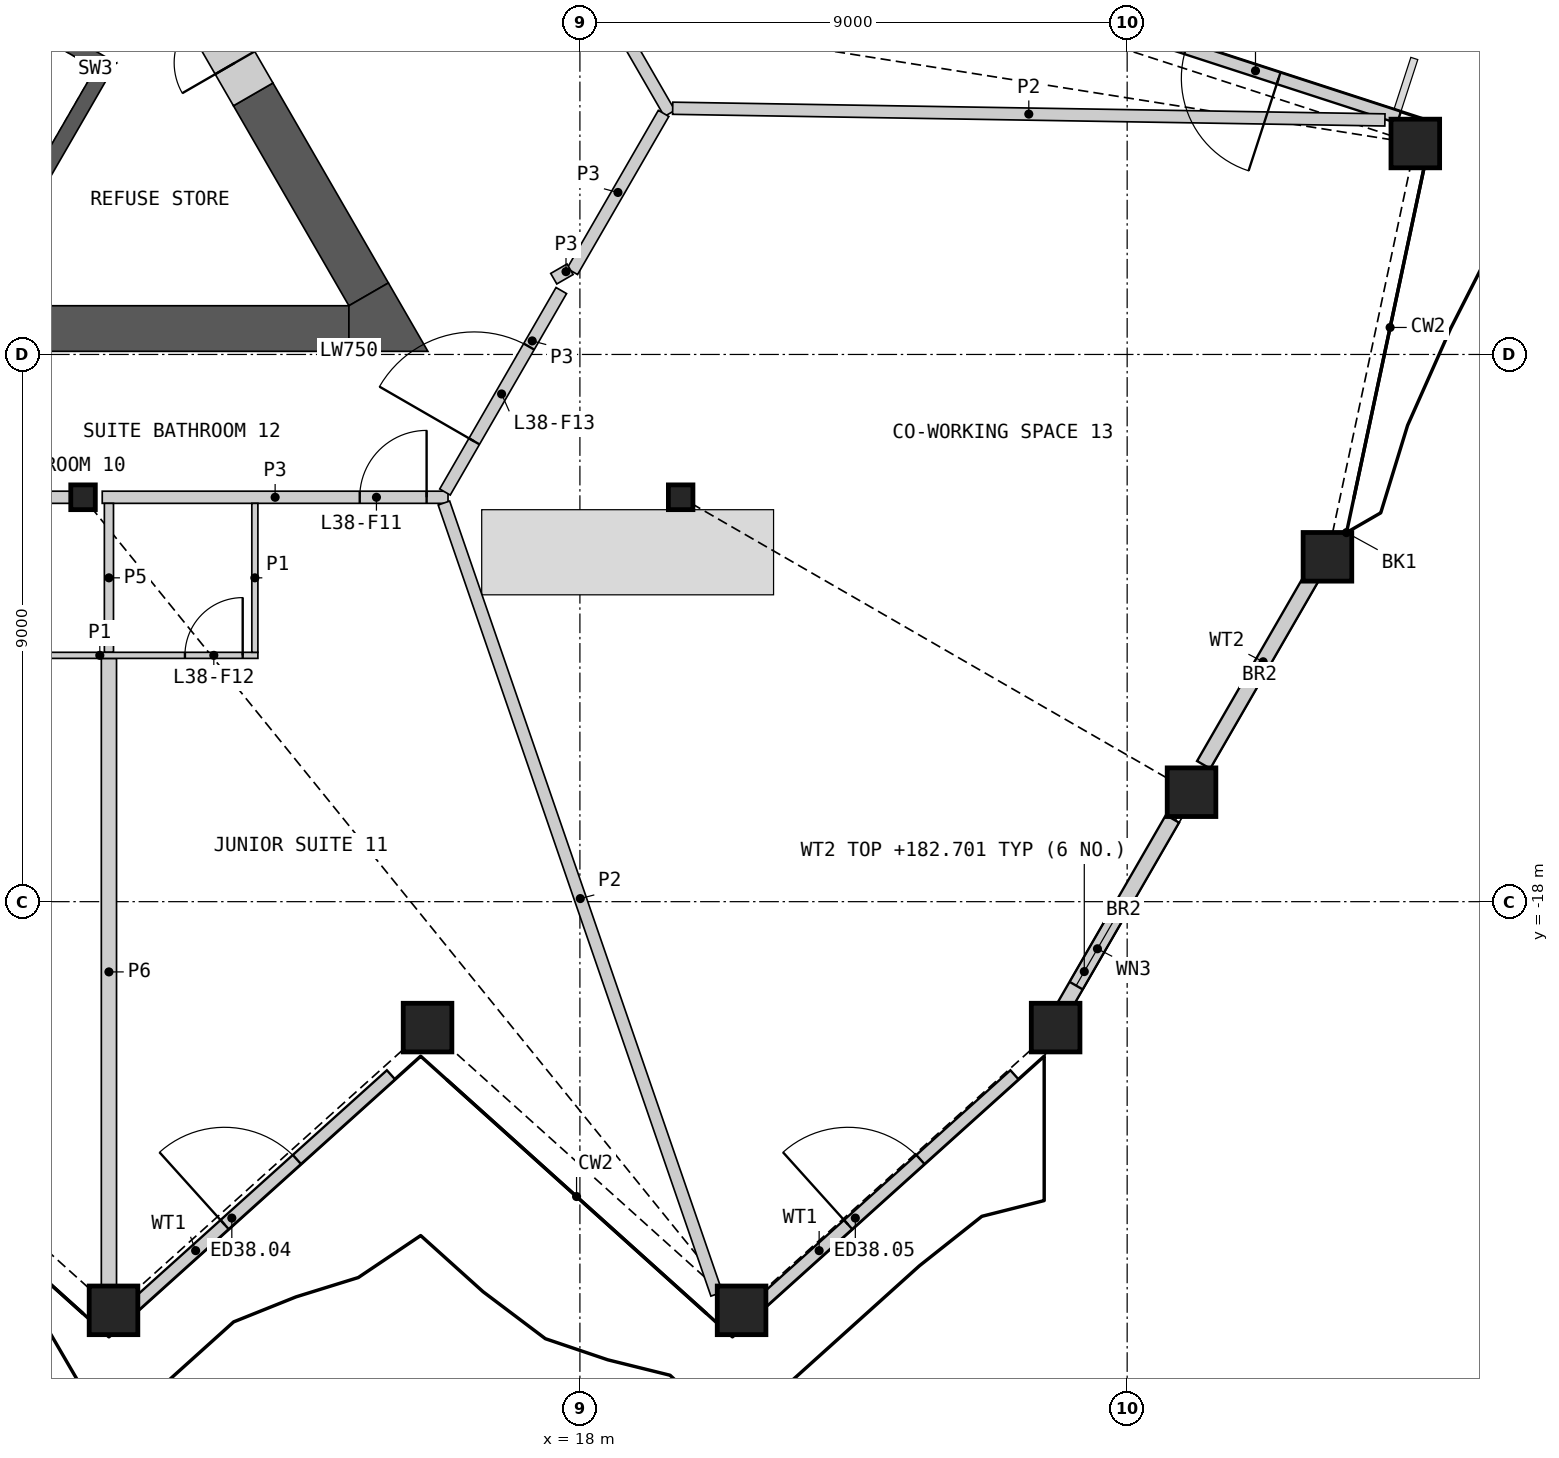
"""IFC4 building model, lengths in metres.
Left out: names, types, materials, properties, quantities, classifications, styles, units other than length and angle.
Written with IfcOpenShell. Run it as: python <this file> out.ifc"""

import sys

from ifc_helpers import new_model, si_unit, direction, frame, frame_2d, origin, origin_2d, place, context, subcontext, project, spatial, polyline, rectangle, hollow_rectangle, i_section, outline, extrude, element, fill, save


model = new_model("IFC4")
c1 = context("Model", 3, precision=1e-05, world=origin(), true_north=direction((0.0, 1.0)))
c2 = subcontext(c1, "Body", "Model", "MODEL_VIEW")
j1 = project(units=[si_unit("LENGTHUNIT", "METRE"), si_unit("PLANEANGLEUNIT", "RADIAN")], contexts=[c1])
p1 = place(None, origin())
s1 = spatial("IfcSite", under=j1, at=p1, CompositionType="ELEMENT")
p2 = place(p1, origin())
s2 = spatial("IfcBuilding", under=s1, at=p2, CompositionType="ELEMENT")
p3 = place(p2, frame((0.0, 0.0, 180.0)))
s3 = spatial("IfcBuildingStorey", under=s2, at=p3, CompositionType="ELEMENT", Elevation=180.0)
for number, where, z_axis, x_axis in (
    (1, (10.329, -24.722, 0.0), (0.0, 0.0, 1.0), (1.0, 0.0, 0.0)),
    (2, (15.494, -20.071, 0.0), (0.0, 0.0, 1.0), (1.0, 0.0, 0.0)),
    (3, (20.659, -24.722, 0.0), (0.0, 0.0, 1.0), (1.0, 0.0, 0.0)),
    (4, (25.823, -20.071, 0.0), (0.0, 0.0, 1.0), (1.0, 0.0, 0.0)),
    (5, (28.059, -16.2, 0.0), (0.0, 0.0, 1.0), (1.0, 0.0, 0.0)),
    (6, (30.294, -12.328, 0.0), (0.0, 0.0, 1.0), (1.0, 0.0, 0.0)),
    (7, (31.739, -5.53, 0.0), (0.0, 0.0, 1.0), (1.0, 0.0, 0.0)),
):
    element("IfcColumn", number, at=place(p3, frame(where, z_axis=z_axis, x_axis=x_axis)), inside=s3, PredefinedType="COLUMN", context=c2, shape_type="SweptSolid", body=[
        extrude(hollow_rectangle(XDim=0.8, YDim=0.8, WallThickness=0.05, at=origin_2d()), origin(), (0.0, 0.0, 1.0), 3.6),
    ])
for number, where, z_axis, x_axis in (
    (8, (9.828, -11.349, 0.0), (0.0, 0.0, 1.0), (1.0, 0.0, 0.0)),
    (9, (19.657, -11.349, 0.0), (0.0, 0.0, 1.0), (1.0, 0.0, 0.0)),
):
    element("IfcColumn", number, at=place(p3, frame(where, z_axis=z_axis, x_axis=x_axis)), inside=s3, PredefinedType="COLUMN", context=c2, shape_type="SweptSolid", body=[
        extrude(i_section(OverallWidth=0.404, OverallDepth=0.407, WebThickness=0.027, FlangeThickness=0.044, at=origin_2d()), origin(), (0.0, 0.0, 1.0), 3.6),
    ])
p4 = place(p3, frame((10.609, -24.704, 0.0), z_axis=(0.0, 0.0, 1.0), x_axis=(0.743140362926, 0.669135562491, 0.0)))
e10 = element("IfcWall", 10, at=p4, inside=s3, PredefinedType="SOLIDWALL", context=c2, shape_type="SweptSolid", body=[
    extrude(rectangle(XDim=5.763, YDim=0.2, at=frame_2d((2.882, 0.0))), origin(), (0.0, 0.0, 1.0), 2.701),
])
p5 = place(p4, frame((2.082, 0.0, 0.0)))
e11 = element("IfcOpeningElement", 11, at=p5, cuts=e10, PredefinedType="OPENING", context=c2, shape_type="SweptSolid", body=[
    extrude(rectangle(XDim=1.6, YDim=2.4, at=frame_2d((0.8, 1.2))), frame((0.0, 0.11, 0.0), z_axis=(0.0, -1.0, 0.0), x_axis=(1.0, 0.0, 0.0)), (0.0, 0.0, 1.0), 0.22),
])
p6 = place(p3, frame((20.864, -24.704, 0.0), z_axis=(0.0, 0.0, 1.0), x_axis=(0.743140362926, 0.669135562491, 0.0)))
e12 = element("IfcWall", 12, at=p6, inside=s3, PredefinedType="SOLIDWALL", context=c2, shape_type="SweptSolid", body=[
    extrude(rectangle(XDim=5.763, YDim=0.2, at=frame_2d((2.882, 0.0))), origin(), (0.0, 0.0, 1.0), 2.701),
])
p7 = place(p6, frame((2.082, 0.0, 0.0)))
e13 = element("IfcOpeningElement", 13, at=p7, cuts=e12, PredefinedType="OPENING", context=c2, shape_type="SweptSolid", body=[
    extrude(rectangle(XDim=1.6, YDim=2.4, at=frame_2d((0.8, 1.2))), frame((0.0, 0.11, 0.0), z_axis=(0.0, -1.0, 0.0), x_axis=(1.0, 0.0, 0.0)), (0.0, 0.0, 1.0), 0.22),
])
p8 = place(p3, frame((25.811, -19.987, 0.0), z_axis=(0.0, 0.0, 1.0), x_axis=(0.499981047344, 0.866036345829, 0.0)))
e14 = element("IfcWall", 14, at=p8, inside=s3, PredefinedType="SOLIDWALL", context=c2, shape_type="SweptSolid", body=[
    extrude(rectangle(XDim=3.868, YDim=0.25, at=frame_2d((1.934, 0.0))), origin(), (0.0, 0.0, 1.0), 2.701),
])
p9 = place(p8, frame((0.7, 0.0, 1.7)))
e15 = element("IfcOpeningElement", 15, at=p9, cuts=e14, PredefinedType="OPENING", context=c2, shape_type="SweptSolid", body=[
    extrude(rectangle(XDim=1.4, YDim=0.8, at=frame_2d((0.7, 0.4))), frame((0.0, 0.135, 0.0), z_axis=(0.0, -1.0, 0.0), x_axis=(1.0, 0.0, 0.0)), (0.0, 0.0, 1.0), 0.27),
])
p10 = place(p3, frame((28.258, -15.75, 0.0), z_axis=(0.0, 0.0, 1.0), x_axis=(0.499995984904, 0.866027721889, 0.0)))
e16 = element("IfcWall", 16, at=p10, inside=s3, PredefinedType="SOLIDWALL", context=c2, shape_type="SweptSolid", body=[
    extrude(rectangle(XDim=3.915, YDim=0.25, at=frame_2d((1.957, 0.0))), origin(), (0.0, 0.0, 1.0), 2.701),
])
p11 = place(p3, frame((31.471, -5.101, 0.0), z_axis=(0.0, 0.0, 1.0), x_axis=(-0.951053678976, 0.30902572661, 0.0)))
e17 = element("IfcWall", 17, at=p11, inside=s3, PredefinedType="SOLIDWALL", context=c2, shape_type="SweptSolid", body=[
    extrude(rectangle(XDim=5.763, YDim=0.2, at=frame_2d((2.882, 0.0))), origin(), (0.0, 0.0, 1.0), 2.701),
])
p12 = place(p11, frame((2.082, 0.0, 0.0)))
e18 = element("IfcOpeningElement", 18, at=p12, cuts=e17, PredefinedType="OPENING", context=c2, shape_type="SweptSolid", body=[
    extrude(rectangle(XDim=1.6, YDim=2.4, at=frame_2d((0.8, 1.2))), frame((0.0, 0.11, 0.0), z_axis=(0.0, -1.0, 0.0), x_axis=(1.0, 0.0, 0.0)), (0.0, 0.0, 1.0), 0.22),
])
p13 = place(p3, origin())
e19 = element("IfcWall", 19, at=p13, inside=s3, PredefinedType="SHEAR", context=c2, shape_type="SweptSolid", body=[
    extrude(outline(polyline([(8.83, -6.881), (10.374, -4.206), (10.032, -4.298), (8.738, -6.539), (8.83, -6.881)])), origin(), (0.0, 0.0, 1.0), 3.25),
])
p14 = place(p3, origin())
e20 = element("IfcWall", 20, at=p14, inside=s3, PredefinedType="SHEAR", context=c2, shape_type="SweptSolid", body=[
    extrude(outline(polyline([(10.032, -4.298), (10.374, -4.206), (5.307, -1.281), (5.182, -1.498), (10.032, -4.298)])), origin(), (0.0, 0.0, 1.0), 3.25),
])
p15 = place(p3, frame((4.48, -8.574, 0.0), z_axis=(0.0, 0.0, 1.0), x_axis=(1.0, 0.0, 0.0)))
e21 = element("IfcWall", 21, at=p15, inside=s3, PredefinedType="SHEAR", context=c2, shape_type="SweptSolid", body=[
    extrude(rectangle(XDim=9.721, YDim=0.75, at=frame_2d((4.86, 0.0))), origin(), (0.0, 0.0, 1.0), 3.25),
])
p16 = place(p3, frame((14.526, -8.011, 0.0), z_axis=(0.0, 0.0, 1.0), x_axis=(-0.499996970966, 0.866027152591, 0.0)))
e22 = element("IfcWall", 22, at=p16, inside=s3, PredefinedType="SHEAR", context=c2, shape_type="SweptSolid", body=[
    extrude(rectangle(XDim=3.798, YDim=0.75, at=frame_2d((1.899, 0.0))), origin(), (0.0, 0.0, 1.0), 3.25),
])
p17 = place(p3, origin())
e23 = element("IfcWall", 23, at=p17, inside=s3, PredefinedType="SHEAR", context=c2, shape_type="SweptSolid", body=[
    extrude(outline(polyline([(14.201, -8.949), (14.201, -8.199), (14.851, -7.824), (15.5, -8.949), (14.201, -8.949)])), origin(), (0.0, 0.0, 1.0), 3.25),
])
p18 = place(p3, frame((12.627, -4.722, 0.0), z_axis=(0.0, 0.0, 1.0), x_axis=(-0.499946605688, 0.86605622881, 0.0)))
e24 = element("IfcWall", 24, at=p18, inside=s3, PredefinedType="SHEAR", context=c2, shape_type="SweptSolid", body=[
    extrude(rectangle(XDim=2.2, YDim=0.75, at=frame_2d((1.1, 0.0))), origin(), (0.0, 0.0, 1.0), 3.25),
])
p19 = place(p18, frame((0.6, 0.0, 0.0)))
e25 = element("IfcOpeningElement", 25, at=p19, cuts=e24, PredefinedType="OPENING", context=c2, shape_type="SweptSolid", body=[
    extrude(rectangle(XDim=1.0, YDim=2.1, at=frame_2d((0.5, 1.05))), frame((0.0, 0.385, 0.0), z_axis=(0.0, -1.0, 0.0), x_axis=(1.0, 0.0, 0.0)), (0.0, 0.0, 1.0), 0.77),
])
p20 = place(p3, frame((5.377, 19.385, 0.0), z_axis=(0.0, 0.0, 1.0), x_axis=(0.500000757641, -0.86602496636, 0.0)))
e26 = element("IfcWall", 26, at=p20, inside=s3, PredefinedType="PARTITIONING", context=c2, shape_type="SweptSolid", body=[
    extrude(rectangle(XDim=28.198, YDim=0.2, at=frame_2d((14.099, 0.0))), origin(), (0.0, 0.0, 1.0), 3.25),
])
p21 = place(p20, frame((22.735, 0.0, 0.0)))
e27 = element("IfcOpeningElement", 27, at=p21, cuts=e26, PredefinedType="OPENING", context=c2, shape_type="SweptSolid", body=[
    extrude(rectangle(XDim=1.8, YDim=2.1, at=frame_2d((0.9, 1.05))), frame((0.0, 0.11, 0.0), z_axis=(0.0, -1.0, 0.0), x_axis=(1.0, 0.0, 0.0)), (0.0, 0.0, 1.0), 0.22),
])
p22 = place(p20, frame((14.402, 0.0, 0.0)))
e28 = element("IfcOpeningElement", 28, at=p22, cuts=e26, PredefinedType="OPENING", context=c2, shape_type="SweptSolid", body=[
    extrude(rectangle(XDim=1.0, YDim=2.1, at=frame_2d((0.5, 1.05))), frame((0.0, 0.11, 0.0), z_axis=(0.0, -1.0, 0.0), x_axis=(1.0, 0.0, 0.0)), (0.0, 0.0, 1.0), 0.22),
])
p23 = place(p20, frame((12.796, 0.0, 0.0)))
e29 = element("IfcOpeningElement", 29, at=p23, cuts=e26, PredefinedType="OPENING", context=c2, shape_type="SweptSolid", body=[
    extrude(rectangle(XDim=1.0, YDim=2.1, at=frame_2d((0.5, 1.05))), frame((0.0, 0.11, 0.0), z_axis=(0.0, -1.0, 0.0), x_axis=(1.0, 0.0, 0.0)), (0.0, 0.0, 1.0), 0.22),
])
p24 = place(p20, frame((4.164, 0.0, 0.0)))
e30 = element("IfcOpeningElement", 30, at=p24, cuts=e26, PredefinedType="OPENING", context=c2, shape_type="SweptSolid", body=[
    extrude(rectangle(XDim=1.0, YDim=2.1, at=frame_2d((0.5, 1.05))), frame((0.0, 0.11, 0.0), z_axis=(0.0, -1.0, 0.0), x_axis=(1.0, 0.0, 0.0)), (0.0, 0.0, 1.0), 0.22),
])
p25 = place(p20, frame((1.452, 0.0, 0.0)))
e31 = element("IfcOpeningElement", 31, at=p25, cuts=e26, PredefinedType="OPENING", context=c2, shape_type="SweptSolid", body=[
    extrude(rectangle(XDim=0.95, YDim=2.1, at=frame_2d((0.475, 1.05))), frame((0.0, 0.11, 0.0), z_axis=(0.0, -1.0, 0.0), x_axis=(1.0, 0.0, 0.0)), (0.0, 0.0, 1.0), 0.22),
])
p26 = place(p3, frame((10.254, -24.312, 0.0), z_axis=(0.0, 0.0, 1.0), x_axis=(0.0, 1.0, 0.0)))
e32 = element("IfcWall", 32, at=p26, inside=s3, PredefinedType="PARTITIONING", context=c2, shape_type="SweptSolid", body=[
    extrude(rectangle(XDim=10.313, YDim=0.25, at=frame_2d((5.156, 0.0))), origin(), (0.0, 0.0, 1.0), 2.404),
])
p27 = place(p3, frame((0.214, -11.349, 0.0), z_axis=(0.0, 0.0, 1.0), x_axis=(1.0, 0.0, 0.0)))
e33 = element("IfcWall", 33, at=p27, inside=s3, PredefinedType="PARTITIONING", context=c2, shape_type="SweptSolid", body=[
    extrude(rectangle(XDim=9.401, YDim=0.2, at=frame_2d((4.701, 0.0))), origin(), (0.0, 0.0, 1.0), 3.25),
])
p28 = place(p27, frame((3.551, 0.0, 0.0)))
e34 = element("IfcOpeningElement", 34, at=p28, cuts=e33, PredefinedType="OPENING", context=c2, shape_type="SweptSolid", body=[
    extrude(rectangle(XDim=1.0, YDim=2.1, at=frame_2d((0.5, 1.05))), frame((0.0, 0.11, 0.0), z_axis=(0.0, -1.0, 0.0), x_axis=(1.0, 0.0, 0.0)), (0.0, 0.0, 1.0), 0.22),
])
p29 = place(p27, frame((5.251, 0.0, 0.0)))
e35 = element("IfcOpeningElement", 35, at=p29, cuts=e33, PredefinedType="OPENING", context=c2, shape_type="SweptSolid", body=[
    extrude(rectangle(XDim=1.0, YDim=2.1, at=frame_2d((0.5, 1.05))), frame((0.0, 0.11, 0.0), z_axis=(0.0, -1.0, 0.0), x_axis=(1.0, 0.0, 0.0)), (0.0, 0.0, 1.0), 0.22),
])
p30 = place(p3, frame((10.144, -11.349, 0.0), z_axis=(0.0, 0.0, 1.0), x_axis=(1.0, 0.0, 0.0)))
e36 = element("IfcWall", 36, at=p30, inside=s3, PredefinedType="PARTITIONING", context=c2, shape_type="SweptSolid", body=[
    extrude(rectangle(XDim=5.687, YDim=0.2, at=frame_2d((2.843, 0.0))), origin(), (0.0, 0.0, 1.0), 3.25),
])
p31 = place(p30, frame((4.235, 0.0, 0.0)))
e37 = element("IfcOpeningElement", 37, at=p31, cuts=e36, PredefinedType="OPENING", context=c2, shape_type="SweptSolid", body=[
    extrude(rectangle(XDim=1.1, YDim=2.1, at=frame_2d((0.55, 1.05))), frame((0.0, 0.11, 0.0), z_axis=(0.0, -1.0, 0.0), x_axis=(1.0, 0.0, 0.0)), (0.0, 0.0, 1.0), 0.22),
])
p32 = place(p3, frame((15.781, -11.262, 0.0), z_axis=(0.0, 0.0, 1.0), x_axis=(0.499989446428, 0.866031496806, 0.0)))
e38 = element("IfcWall", 38, at=p32, inside=s3, PredefinedType="PARTITIONING", context=c2, shape_type="SweptSolid", body=[
    extrude(rectangle(XDim=3.826, YDim=0.2, at=frame_2d((1.913, 0.0))), origin(), (0.0, 0.0, 1.0), 3.25),
])
p33 = place(p32, frame((0.962, 0.0, 0.0)))
e39 = element("IfcOpeningElement", 39, at=p33, cuts=e38, PredefinedType="OPENING", context=c2, shape_type="SweptSolid", body=[
    extrude(rectangle(XDim=1.8, YDim=2.1, at=frame_2d((0.9, 1.05))), frame((0.0, 0.11, 0.0), z_axis=(0.0, -1.0, 0.0), x_axis=(1.0, 0.0, 0.0)), (0.0, 0.0, 1.0), 0.22),
])
p34 = place(p3, frame((17.875, -7.635, 0.0), z_axis=(0.0, 0.0, 1.0), x_axis=(0.499952404951, 0.866052881055, 0.0)))
e40 = element("IfcWall", 40, at=p34, inside=s3, PredefinedType="PARTITIONING", context=c2, shape_type="SweptSolid", body=[
    extrude(rectangle(XDim=3.002, YDim=0.2, at=frame_2d((1.501, 0.0))), origin(), (0.0, 0.0, 1.0), 3.25),
])
p35 = place(p3, frame((17.57, -7.754, 0.0), z_axis=(0.0, 0.0, 1.0), x_axis=(0.866054481515, 0.499949632511, 0.0)))
e41 = element("IfcWall", 41, at=p35, inside=s3, PredefinedType="PARTITIONING", context=c2, shape_type="SweptSolid", body=[
    extrude(rectangle(XDim=0.31, YDim=0.2, at=frame_2d((0.155, 0.0))), origin(), (0.0, 0.0, 1.0), 3.25),
])
p36 = place(p3, frame((15.763, -11.444, 0.0), z_axis=(0.0, 0.0, 1.0), x_axis=(0.325902118519, -0.945403516571, 0.0)))
e42 = element("IfcWall", 42, at=p36, inside=s3, PredefinedType="PARTITIONING", context=c2, shape_type="SweptSolid", body=[
    extrude(rectangle(XDim=13.763, YDim=0.2, at=frame_2d((6.881, 0.0))), origin(), (0.0, 0.0, 1.0), 2.404),
])
p37 = place(p3, frame((19.526, -4.95, 0.0), z_axis=(0.0, 0.0, 1.0), x_axis=(0.99986514458, -0.016422321819, 0.0)))
e43 = element("IfcWall", 43, at=p37, inside=s3, PredefinedType="PARTITIONING", context=c2, shape_type="SweptSolid", body=[
    extrude(rectangle(XDim=11.715, YDim=0.2, at=frame_2d((5.857, 0.0))), origin(), (0.0, 0.0, 1.0), 2.404),
])
p38 = place(p3, frame((10.254, -13.899, 0.0), z_axis=(0.0, 0.0, 1.0), x_axis=(0.0, 1.0, 0.0)))
e44 = element("IfcWall", 44, at=p38, inside=s3, PredefinedType="PLUMBINGWALL", context=c2, shape_type="SweptSolid", body=[
    extrude(rectangle(XDim=2.45, YDim=0.15, at=frame_2d((1.225, 0.0))), origin(), (0.0, 0.0, 1.0), 2.404),
])
p39 = place(p3, frame((7.504, -13.949, 0.0), z_axis=(0.0, 0.0, 1.0), x_axis=(1.0, 0.0, 0.0)))
e45 = element("IfcWall", 45, at=p39, inside=s3, PredefinedType="PARTITIONING", context=c2, shape_type="SweptSolid", body=[
    extrude(rectangle(XDim=5.2, YDim=0.1, at=frame_2d((2.6, 0.0))), origin(), (0.0, 0.0, 1.0), 2.404),
])
p40 = place(p39, frame((0.25, 0.0, 0.0)))
e46 = element("IfcOpeningElement", 46, at=p40, cuts=e45, PredefinedType="OPENING", context=c2, shape_type="SweptSolid", body=[
    extrude(rectangle(XDim=0.95, YDim=2.1, at=frame_2d((0.475, 1.05))), frame((0.0, 0.06, 0.0), z_axis=(0.0, -1.0, 0.0), x_axis=(1.0, 0.0, 0.0)), (0.0, 0.0, 1.0), 0.12),
])
p41 = place(p39, frame((4.0, 0.0, 0.0)))
e47 = element("IfcOpeningElement", 47, at=p41, cuts=e45, PredefinedType="OPENING", context=c2, shape_type="SweptSolid", body=[
    extrude(rectangle(XDim=0.95, YDim=2.1, at=frame_2d((0.475, 1.05))), frame((0.0, 0.06, 0.0), z_axis=(0.0, -1.0, 0.0), x_axis=(1.0, 0.0, 0.0)), (0.0, 0.0, 1.0), 0.12),
])
p42 = place(p3, frame((12.654, -13.899, 0.0), z_axis=(0.0, 0.0, 1.0), x_axis=(0.0, 1.0, 0.0)))
e48 = element("IfcWall", 48, at=p42, inside=s3, PredefinedType="PARTITIONING", context=c2, shape_type="SweptSolid", body=[
    extrude(rectangle(XDim=2.45, YDim=0.1, at=frame_2d((1.225, 0.0))), origin(), (0.0, 0.0, 1.0), 2.404),
])
p43 = place(p5, origin())
e49 = element("IfcDoor", 49, at=p43, inside=s3, OperationType="DOUBLE_DOOR_SINGLE_SWING", PredefinedType="DOOR", context=c2, shape_type="SweptSolid", body=[
    extrude(rectangle(XDim=1.6, YDim=2.4, at=frame_2d((0.8, 1.2))), frame((0.0, 0.025, 0.0), z_axis=(0.0, -1.0, 0.0), x_axis=(1.0, 0.0, 0.0)), (0.0, 0.0, 1.0), 0.05),
])
fill(e11, e49)
p44 = place(p7, origin())
e50 = element("IfcDoor", 50, at=p44, inside=s3, OperationType="DOUBLE_DOOR_SINGLE_SWING", PredefinedType="DOOR", context=c2, shape_type="SweptSolid", body=[
    extrude(rectangle(XDim=1.6, YDim=2.4, at=frame_2d((0.8, 1.2))), frame((0.0, 0.025, 0.0), z_axis=(0.0, -1.0, 0.0), x_axis=(1.0, 0.0, 0.0)), (0.0, 0.0, 1.0), 0.05),
])
fill(e13, e50)
p45 = place(p9, origin())
e51 = element("IfcWindow", 51, at=p45, inside=s3, PartitioningType="SINGLE_PANEL", PredefinedType="WINDOW", context=c2, shape_type="SweptSolid", body=[
    extrude(rectangle(XDim=1.4, YDim=0.8, at=frame_2d((0.7, 0.4))), frame((0.0, 0.03, 0.0), z_axis=(0.0, -1.0, 0.0), x_axis=(1.0, 0.0, 0.0)), (0.0, 0.0, 1.0), 0.06),
])
fill(e15, e51)
p46 = place(p12, origin())
e52 = element("IfcDoor", 52, at=p46, inside=s3, OperationType="DOUBLE_DOOR_SINGLE_SWING", PredefinedType="DOOR", context=c2, shape_type="SweptSolid", body=[
    extrude(rectangle(XDim=1.6, YDim=2.4, at=frame_2d((0.8, 1.2))), frame((0.0, 0.025, 0.0), z_axis=(0.0, -1.0, 0.0), x_axis=(1.0, 0.0, 0.0)), (0.0, 0.0, 1.0), 0.05),
])
fill(e18, e52)
p47 = place(p19, origin())
e53 = element("IfcDoor", 53, at=p47, inside=s3, OperationType="SINGLE_SWING_LEFT", PredefinedType="DOOR", context=c2, shape_type="SweptSolid", body=[
    extrude(rectangle(XDim=1.0, YDim=2.1, at=frame_2d((0.5, 1.05))), frame((0.0, 0.13, 0.0), z_axis=(0.0, -1.0, 0.0), x_axis=(1.0, 0.0, 0.0)), (0.0, 0.0, 1.0), 0.05),
])
fill(e25, e53)
p48 = place(p31, origin())
e54 = element("IfcDoor", 54, at=p48, inside=s3, OperationType="SINGLE_SWING_RIGHT", PredefinedType="DOOR", context=c2, shape_type="SweptSolid", body=[
    extrude(rectangle(XDim=1.1, YDim=2.1, at=frame_2d((0.55, 1.05))), frame((0.0, 0.025, 0.0), z_axis=(0.0, -1.0, 0.0), x_axis=(1.0, 0.0, 0.0)), (0.0, 0.0, 1.0), 0.05),
])
fill(e37, e54)
p49 = place(p41, origin())
e55 = element("IfcDoor", 55, at=p49, inside=s3, OperationType="SINGLE_SWING_RIGHT", PredefinedType="DOOR", context=c2, shape_type="SweptSolid", body=[
    extrude(rectangle(XDim=0.95, YDim=2.1, at=frame_2d((0.475, 1.05))), frame((0.0, 0.025, 0.0), z_axis=(0.0, -1.0, 0.0), x_axis=(1.0, 0.0, 0.0)), (0.0, 0.0, 1.0), 0.05),
])
fill(e47, e55)
p50 = place(p33, origin())
e56 = element("IfcDoor", 56, at=p50, inside=s3, OperationType="DOUBLE_DOOR_SINGLE_SWING", PredefinedType="DOOR", context=c2, shape_type="SweptSolid", body=[
    extrude(rectangle(XDim=1.8, YDim=2.1, at=frame_2d((0.9, 1.05))), frame((0.0, 0.025, 0.0), z_axis=(0.0, -1.0, 0.0), x_axis=(1.0, 0.0, 0.0)), (0.0, 0.0, 1.0), 0.05),
])
fill(e39, e56)
save(model, sys.argv[1])
